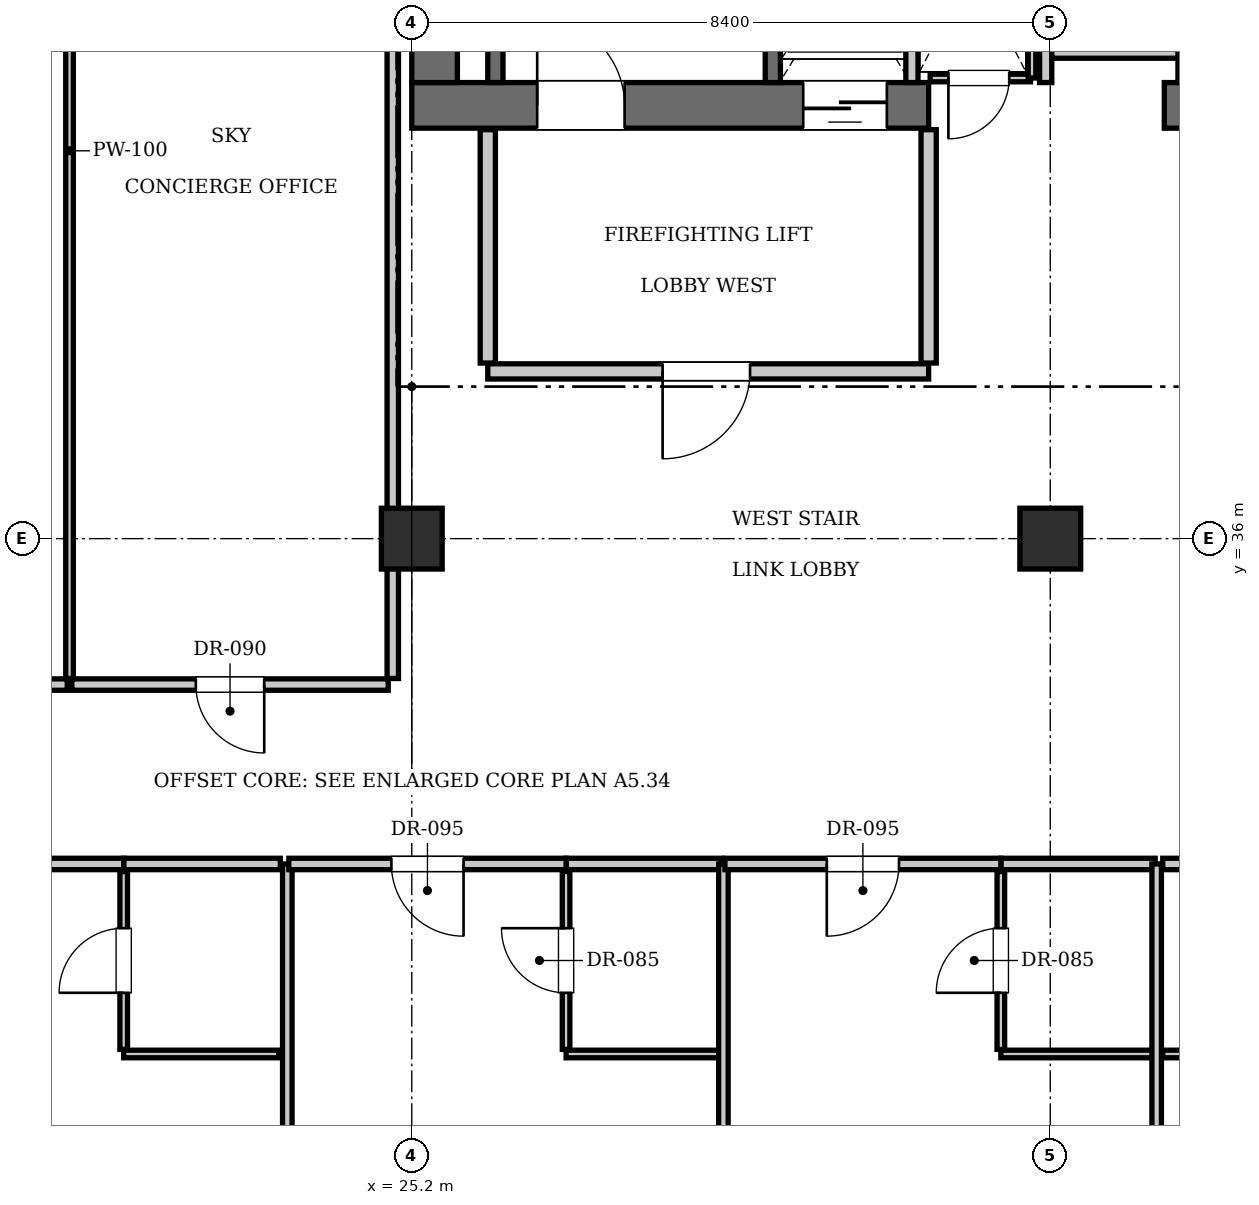
"""IFC4 building model, lengths in metres.
Left out: names, types, materials, properties, quantities, classifications, styles, units other than length and angle.
Written with IfcOpenShell. Run it as: python <this file> out.ifc"""

import sys

from ifc_helpers import new_model, si_unit, direction, frame, frame_2d, origin, origin_2d, place, context, subcontext, project, spatial, rectangle, extrude, element, fill, save


model = new_model("IFC4")
c1 = context("Model", 3, precision=1e-05, world=origin(), true_north=direction((0.0, 1.0)))
c2 = subcontext(c1, "Body", "Model", "MODEL_VIEW")
j1 = project(units=[si_unit("LENGTHUNIT", "METRE"), si_unit("PLANEANGLEUNIT", "RADIAN")], contexts=[c1])
p1 = place(None, origin())
s1 = spatial("IfcSite", under=j1, at=p1, CompositionType="ELEMENT")
p2 = place(p1, origin())
s2 = spatial("IfcBuilding", under=s1, at=p2, CompositionType="ELEMENT")
p3 = place(p2, frame((0.0, 0.0, 333.55)))
s3 = spatial("IfcBuildingStorey", under=s2, at=p3, CompositionType="ELEMENT", Elevation=333.55)
p4 = place(p3, frame((25.2, 41.7, 0.0), z_axis=(0.0, 0.0, 1.0), x_axis=(1.0, 0.0, 0.0)))
e1 = element("IfcWall", 1, at=p4, inside=s3, PredefinedType="SHEAR", context=c2, shape_type="SweptSolid", body=[
    extrude(rectangle(XDim=6.8, YDim=0.6, at=frame_2d((3.4, 0.0))), origin(), (0.0, 0.0, 1.0), 3.85),
])
p5 = place(p4, frame((1.65, 0.0, 0.0)))
e2 = element("IfcOpeningElement", 2, at=p5, cuts=e1, PredefinedType="OPENING", context=c2, shape_type="SweptSolid", body=[
    extrude(rectangle(XDim=1.15, YDim=2.15, at=frame_2d((0.575, 1.075))), frame((0.0, 0.31, 0.0), z_axis=(0.0, -1.0, 0.0), x_axis=(1.0, 0.0, 0.0)), (0.0, 0.0, 1.0), 0.62),
])
p6 = place(p4, frame((5.15, 0.0, 0.0)))
e3 = element("IfcOpeningElement", 3, at=p6, cuts=e1, PredefinedType="OPENING", context=c2, shape_type="SweptSolid", body=[
    extrude(rectangle(XDim=1.1, YDim=2.2, at=frame_2d((0.55, 1.1))), frame((0.0, 0.31, 0.0), z_axis=(0.0, -1.0, 0.0), x_axis=(1.0, 0.0, 0.0)), (0.0, 0.0, 1.0), 0.62),
])
p7 = place(p3, frame((35.1, 41.7, 0.0), z_axis=(0.0, 0.0, 1.0), x_axis=(1.0, 0.0, 0.0)))
e4 = element("IfcWall", 4, at=p7, inside=s3, PredefinedType="SHEAR", context=c2, shape_type="SweptSolid", body=[
    extrude(rectangle(XDim=5.4, YDim=0.6, at=frame_2d((2.7, 0.0))), origin(), (0.0, 0.0, 1.0), 3.85),
])
p8 = place(p3, frame((25.5, 42.0, 0.0), z_axis=(0.0, 0.0, 1.0), x_axis=(0.0, 1.0, 0.0)))
e5 = element("IfcWall", 5, at=p8, inside=s3, PredefinedType="SHEAR", context=c2, shape_type="SweptSolid", body=[
    extrude(rectangle(XDim=2.325, YDim=0.6, at=frame_2d((1.163, 0.0))), origin(), (0.0, 0.0, 1.0), 3.85),
])
for number, where, z_axis, x_axis in (
    (6, (25.2, 36.0, 0.0), (0.0, 0.0, 1.0), (1.0, 0.0, 0.0)),
    (7, (33.6, 36.0, 0.0), (0.0, 0.0, 1.0), (1.0, 0.0, 0.0)),
):
    element("IfcColumn", number, at=place(p3, frame(where, z_axis=z_axis, x_axis=x_axis)), inside=s3, PredefinedType="COLUMN", context=c2, shape_type="SweptSolid", body=[
        extrude(rectangle(XDim=0.8, YDim=0.8, at=origin_2d()), origin(), (0.0, 0.0, 1.0), 3.85),
    ])
p9 = place(p3, frame((29.95, 42.0, 0.0), z_axis=(0.0, 0.0, 1.0), x_axis=(0.0, 1.0, 0.0)))
e8 = element("IfcWall", 8, at=p9, inside=s3, PredefinedType="SOLIDWALL", context=c2, shape_type="SweptSolid", body=[
    extrude(rectangle(XDim=9.15, YDim=0.2, at=frame_2d((4.575, 0.0))), origin(), (0.0, 0.0, 1.0), 3.61),
])
p10 = place(p3, frame((26.3, 42.0, 0.0), z_axis=(0.0, 0.0, 1.0), x_axis=(0.0, 1.0, 0.0)))
e9 = element("IfcWall", 9, at=p10, inside=s3, PredefinedType="SOLIDWALL", context=c2, shape_type="SweptSolid", body=[
    extrude(rectangle(XDim=9.12, YDim=0.2, at=frame_2d((4.56, 0.0))), origin(), (0.0, 0.0, 1.0), 3.61),
])
p11 = place(p3, frame((31.78, 42.0, 0.0), z_axis=(0.0, 0.0, 1.0), x_axis=(0.0, 1.0, 0.0)))
e10 = element("IfcWall", 10, at=p11, inside=s3, PredefinedType="SOLIDWALL", context=c2, shape_type="SweptSolid", body=[
    extrude(rectangle(XDim=2.74, YDim=0.16, at=frame_2d((1.37, 0.0))), origin(), (0.0, 0.0, 1.0), 3.61),
])
for number, where, z_axis, x_axis in (
    (11, (33.54, 42.0, 0.0), (0.0, 0.0, 1.0), (0.0, 1.0, 0.0)),
    (12, (35.36, 42.0, 0.0), (0.0, 0.0, 1.0), (0.0, 1.0, 0.0)),
):
    element("IfcWall", number, at=place(p3, frame(where, z_axis=z_axis, x_axis=x_axis)), inside=s3, PredefinedType="SOLIDWALL", context=c2, shape_type="SweptSolid", body=[
        extrude(rectangle(XDim=2.4, YDim=0.16, at=frame_2d((1.2, 0.0))), origin(), (0.0, 0.0, 1.0), 3.61),
    ])
p12 = place(p3, frame((33.62, 42.4, 0.0), z_axis=(0.0, 0.0, 1.0), x_axis=(1.0, 0.0, 0.0)))
e13 = element("IfcWall", 13, at=p12, inside=s3, PredefinedType="SOLIDWALL", context=c2, shape_type="SweptSolid", body=[
    extrude(rectangle(XDim=1.66, YDim=0.16, at=frame_2d((0.83, 0.0))), origin(), (0.0, 0.0, 1.0), 3.61),
])
p13 = place(p3, frame((26.2, 38.2, 0.0), z_axis=(0.0, 0.0, 1.0), x_axis=(1.0, 0.0, 0.0)))
e14 = element("IfcWall", 14, at=p13, inside=s3, PredefinedType="PARTITIONING", context=c2, shape_type="SweptSolid", body=[
    extrude(rectangle(XDim=5.8, YDim=0.2, at=frame_2d((2.9, 0.0))), origin(), (0.0, 0.0, 1.0), 3.61),
])
p14 = place(p13, frame((2.3, 0.0, 0.0)))
e15 = element("IfcOpeningElement", 15, at=p14, cuts=e14, PredefinedType="OPENING", context=c2, shape_type="SweptSolid", body=[
    extrude(rectangle(XDim=1.15, YDim=2.15, at=frame_2d((0.575, 1.075))), frame((0.0, 0.11, 0.0), z_axis=(0.0, -1.0, 0.0), x_axis=(1.0, 0.0, 0.0)), (0.0, 0.0, 1.0), 0.22),
])
for number, where, z_axis, x_axis in (
    (16, (26.2, 38.31, 0.0), (0.0, 0.0, 1.0), (0.0, 1.0, 0.0)),
    (17, (32.0, 38.31, 0.0), (0.0, 0.0, 1.0), (0.0, 1.0, 0.0)),
):
    element("IfcWall", number, at=place(p3, frame(where, z_axis=z_axis, x_axis=x_axis)), inside=s3, PredefinedType="PARTITIONING", context=c2, shape_type="SweptSolid", body=[
        extrude(rectangle(XDim=3.07, YDim=0.2, at=frame_2d((1.535, 0.0))), origin(), (0.0, 0.0, 1.0), 3.61),
    ])
p15 = place(p3, frame((32.02, 42.06, 0.0), z_axis=(0.0, 0.0, 1.0), x_axis=(1.0, 0.0, 0.0)))
e18 = element("IfcWall", 18, at=p15, inside=s3, PredefinedType="PARTITIONING", context=c2, shape_type="SweptSolid", body=[
    extrude(rectangle(XDim=1.32, YDim=0.1, at=frame_2d((0.66, 0.0))), origin(), (0.0, 0.0, 1.0), 3.61),
])
p16 = place(p15, frame((0.24, 0.0, 0.0)))
e19 = element("IfcOpeningElement", 19, at=p16, cuts=e18, PredefinedType="OPENING", context=c2, shape_type="SweptSolid", body=[
    extrude(rectangle(XDim=0.8, YDim=2.05, at=frame_2d((0.4, 1.025))), frame((0.0, 0.06, 0.0), z_axis=(0.0, -1.0, 0.0), x_axis=(1.0, 0.0, 0.0)), (0.0, 0.0, 1.0), 0.12),
])
p17 = place(p3, frame((33.36, 42.06, 0.0), z_axis=(0.0, 0.0, 1.0), x_axis=(0.0, 1.0, 0.0)))
e20 = element("IfcWall", 20, at=p17, inside=s3, PredefinedType="PARTITIONING", context=c2, shape_type="SweptSolid", body=[
    extrude(rectangle(XDim=2.88, YDim=0.1, at=frame_2d((1.44, 0.0))), origin(), (0.0, 0.0, 1.0), 3.61),
])
p18 = place(p3, frame((24.95, 34.16, 0.0), z_axis=(0.0, 0.0, 1.0), x_axis=(0.0, 1.0, 0.0)))
e21 = element("IfcWall", 21, at=p18, inside=s3, PredefinedType="PARTITIONING", context=c2, shape_type="SweptSolid", body=[
    extrude(rectangle(XDim=13.885, YDim=0.15, at=frame_2d((6.942, 0.0))), origin(), (0.0, 0.0, 1.0), 3.61),
])
p19 = place(p3, frame((18.26, 34.08, 0.0), z_axis=(0.0, 0.0, 1.0), x_axis=(1.0, 0.0, 0.0)))
e22 = element("IfcWall", 22, at=p19, inside=s3, PredefinedType="PARTITIONING", context=c2, shape_type="SweptSolid", body=[
    extrude(rectangle(XDim=2.407, YDim=0.15, at=frame_2d((1.204, 0.0))), origin(), (0.0, 0.0, 1.0), 3.61),
])
p20 = place(p19, frame((0.754, 0.0, 0.0)))
e23 = element("IfcOpeningElement", 23, at=p20, cuts=e22, PredefinedType="OPENING", context=c2, shape_type="SweptSolid", body=[
    extrude(rectangle(XDim=0.9, YDim=2.1, at=frame_2d((0.45, 1.05))), frame((0.0, 0.085, 0.0), z_axis=(0.0, -1.0, 0.0), x_axis=(1.0, 0.0, 0.0)), (0.0, 0.0, 1.0), 0.17),
])
p21 = place(p3, frame((20.698, 34.16, 0.0), z_axis=(0.0, 0.0, 1.0), x_axis=(0.0, 1.0, 0.0)))
e24 = element("IfcWall", 24, at=p21, inside=s3, PredefinedType="PARTITIONING", context=c2, shape_type="SweptSolid", body=[
    extrude(rectangle(XDim=13.885, YDim=0.1, at=frame_2d((6.942, 0.0))), origin(), (0.0, 0.0, 1.0), 3.61),
])
p22 = place(p3, frame((20.728, 34.08, 0.0), z_axis=(0.0, 0.0, 1.0), x_axis=(1.0, 0.0, 0.0)))
e25 = element("IfcWall", 25, at=p22, inside=s3, PredefinedType="PARTITIONING", context=c2, shape_type="SweptSolid", body=[
    extrude(rectangle(XDim=4.162, YDim=0.15, at=frame_2d((2.081, 0.0))), origin(), (0.0, 0.0, 1.0), 3.61),
])
p23 = place(p22, frame((1.631, 0.0, 0.0)))
e26 = element("IfcOpeningElement", 26, at=p23, cuts=e25, PredefinedType="OPENING", context=c2, shape_type="SweptSolid", body=[
    extrude(rectangle(XDim=0.9, YDim=2.1, at=frame_2d((0.45, 1.05))), frame((0.0, 0.085, 0.0), z_axis=(0.0, -1.0, 0.0), x_axis=(1.0, 0.0, 0.0)), (0.0, 0.0, 1.0), 0.17),
])
p24 = place(p3, frame((23.562, 19.34, 0.0), z_axis=(0.0, 0.0, 1.0), x_axis=(0.0, 1.0, 0.0)))
e27 = element("IfcWall", 27, at=p24, inside=s3, PredefinedType="PARTITIONING", context=c2, shape_type="SweptSolid", body=[
    extrude(rectangle(XDim=12.38, YDim=0.125, at=frame_2d((6.19, 0.0))), origin(), (0.0, 0.0, 1.0), 3.61),
])
p25 = place(p3, frame((27.23, 31.72, 0.0), z_axis=(0.0, 0.0, 1.0), x_axis=(1.0, 0.0, 0.0)))
e28 = element("IfcWall", 28, at=p25, inside=s3, PredefinedType="PARTITIONING", context=c2, shape_type="SweptSolid", body=[
    extrude(rectangle(XDim=2.05, YDim=0.15, at=frame_2d((1.025, 0.0))), origin(), (0.0, 0.0, 1.0), 3.61),
])
p26 = place(p3, frame((27.23, 29.22, 0.0), z_axis=(0.0, 0.0, 1.0), x_axis=(1.0, 0.0, 0.0)))
e29 = element("IfcWall", 29, at=p26, inside=s3, PredefinedType="PARTITIONING", context=c2, shape_type="SweptSolid", body=[
    extrude(rectangle(XDim=2.03, YDim=0.1, at=frame_2d((1.015, 0.0))), origin(), (0.0, 0.0, 1.0), 3.61),
])
p27 = place(p3, frame((27.23, 29.28, 0.0), z_axis=(0.0, 0.0, 1.0), x_axis=(0.0, 1.0, 0.0)))
e30 = element("IfcWall", 30, at=p27, inside=s3, PredefinedType="PARTITIONING", context=c2, shape_type="SweptSolid", body=[
    extrude(rectangle(XDim=2.34, YDim=0.1, at=frame_2d((1.17, 0.0))), origin(), (0.0, 0.0, 1.0), 3.61),
])
p28 = place(p27, frame((0.745, 0.0, 0.0)))
e31 = element("IfcOpeningElement", 31, at=p28, cuts=e30, PredefinedType="OPENING", context=c2, shape_type="SweptSolid", body=[
    extrude(rectangle(XDim=0.85, YDim=2.1, at=frame_2d((0.425, 1.05))), frame((0.0, 0.06, 0.0), z_axis=(0.0, -1.0, 0.0), x_axis=(1.0, 0.0, 0.0)), (0.0, 0.0, 1.0), 0.12),
])
p29 = place(p3, frame((23.583, 31.72, 0.0), z_axis=(0.0, 0.0, 1.0), x_axis=(1.0, 0.0, 0.0)))
e32 = element("IfcWall", 32, at=p29, inside=s3, PredefinedType="PARTITIONING", context=c2, shape_type="SweptSolid", body=[
    extrude(rectangle(XDim=3.647, YDim=0.15, at=frame_2d((1.824, 0.0))), origin(), (0.0, 0.0, 1.0), 3.61),
])
p30 = place(p29, frame((1.349, 0.0, 0.0)))
e33 = element("IfcOpeningElement", 33, at=p30, cuts=e32, PredefinedType="OPENING", context=c2, shape_type="SweptSolid", body=[
    extrude(rectangle(XDim=0.95, YDim=2.15, at=frame_2d((0.475, 1.075))), frame((0.0, 0.085, 0.0), z_axis=(0.0, -1.0, 0.0), x_axis=(1.0, 0.0, 0.0)), (0.0, 0.0, 1.0), 0.17),
])
p31 = place(p3, frame((29.3, 13.9, 0.0), z_axis=(0.0, 0.0, 1.0), x_axis=(0.0, 1.0, 0.0)))
e34 = element("IfcWall", 34, at=p31, inside=s3, PredefinedType="PARTITIONING", context=c2, shape_type="SweptSolid", body=[
    extrude(rectangle(XDim=17.82, YDim=0.125, at=frame_2d((8.91, 0.0))), origin(), (0.0, 0.0, 1.0), 3.344),
])
p32 = place(p3, frame((32.95, 31.72, 0.0), z_axis=(0.0, 0.0, 1.0), x_axis=(1.0, 0.0, 0.0)))
e35 = element("IfcWall", 35, at=p32, inside=s3, PredefinedType="PARTITIONING", context=c2, shape_type="SweptSolid", body=[
    extrude(rectangle(XDim=2.03, YDim=0.15, at=frame_2d((1.015, 0.0))), origin(), (0.0, 0.0, 1.0), 3.61),
])
p33 = place(p3, frame((32.95, 29.22, 0.0), z_axis=(0.0, 0.0, 1.0), x_axis=(1.0, 0.0, 0.0)))
e36 = element("IfcWall", 36, at=p33, inside=s3, PredefinedType="PARTITIONING", context=c2, shape_type="SweptSolid", body=[
    extrude(rectangle(XDim=2.01, YDim=0.1, at=frame_2d((1.005, 0.0))), origin(), (0.0, 0.0, 1.0), 3.61),
])
p34 = place(p3, frame((32.95, 29.28, 0.0), z_axis=(0.0, 0.0, 1.0), x_axis=(0.0, 1.0, 0.0)))
e37 = element("IfcWall", 37, at=p34, inside=s3, PredefinedType="PARTITIONING", context=c2, shape_type="SweptSolid", body=[
    extrude(rectangle(XDim=2.34, YDim=0.1, at=frame_2d((1.17, 0.0))), origin(), (0.0, 0.0, 1.0), 3.61),
])
p35 = place(p34, frame((0.745, 0.0, 0.0)))
e38 = element("IfcOpeningElement", 38, at=p35, cuts=e37, PredefinedType="OPENING", context=c2, shape_type="SweptSolid", body=[
    extrude(rectangle(XDim=0.85, YDim=2.1, at=frame_2d((0.425, 1.05))), frame((0.0, 0.06, 0.0), z_axis=(0.0, -1.0, 0.0), x_axis=(1.0, 0.0, 0.0)), (0.0, 0.0, 1.0), 0.12),
])
p36 = place(p3, frame((29.32, 31.72, 0.0), z_axis=(0.0, 0.0, 1.0), x_axis=(1.0, 0.0, 0.0)))
e39 = element("IfcWall", 39, at=p36, inside=s3, PredefinedType="PARTITIONING", context=c2, shape_type="SweptSolid", body=[
    extrude(rectangle(XDim=3.63, YDim=0.15, at=frame_2d((1.815, 0.0))), origin(), (0.0, 0.0, 1.0), 3.61),
])
p37 = place(p36, frame((1.34, 0.0, 0.0)))
e40 = element("IfcOpeningElement", 40, at=p37, cuts=e39, PredefinedType="OPENING", context=c2, shape_type="SweptSolid", body=[
    extrude(rectangle(XDim=0.95, YDim=2.15, at=frame_2d((0.475, 1.075))), frame((0.0, 0.085, 0.0), z_axis=(0.0, -1.0, 0.0), x_axis=(1.0, 0.0, 0.0)), (0.0, 0.0, 1.0), 0.17),
])
p38 = place(p3, frame((35.0, 13.9, 0.0), z_axis=(0.0, 0.0, 1.0), x_axis=(0.0, 1.0, 0.0)))
e41 = element("IfcWall", 41, at=p38, inside=s3, PredefinedType="PARTITIONING", context=c2, shape_type="SweptSolid", body=[
    extrude(rectangle(XDim=17.82, YDim=0.125, at=frame_2d((8.91, 0.0))), origin(), (0.0, 0.0, 1.0), 3.61),
])
p39 = place(p3, frame((35.08, 31.72, 0.0), z_axis=(0.0, 0.0, 1.0), x_axis=(1.0, 0.0, 0.0)))
e42 = element("IfcWall", 42, at=p39, inside=s3, PredefinedType="PARTITIONING", context=c2, shape_type="SweptSolid", body=[
    extrude(rectangle(XDim=1.94, YDim=0.15, at=frame_2d((0.97, 0.0))), origin(), (0.0, 0.0, 1.0), 3.61),
])
p40 = place(p3, frame((35.08, 29.22, 0.0), z_axis=(0.0, 0.0, 1.0), x_axis=(1.0, 0.0, 0.0)))
e43 = element("IfcWall", 43, at=p40, inside=s3, PredefinedType="PARTITIONING", context=c2, shape_type="SweptSolid", body=[
    extrude(rectangle(XDim=1.94, YDim=0.1, at=frame_2d((0.97, 0.0))), origin(), (0.0, 0.0, 1.0), 3.61),
])
p41 = place(p3, frame((21.41, 31.72, 0.0), z_axis=(0.0, 0.0, 1.0), x_axis=(1.0, 0.0, 0.0)))
e44 = element("IfcWall", 44, at=p41, inside=s3, PredefinedType="PARTITIONING", context=c2, shape_type="SweptSolid", body=[
    extrude(rectangle(XDim=2.06, YDim=0.15, at=frame_2d((1.03, 0.0))), origin(), (0.0, 0.0, 1.0), 3.61),
])
p42 = place(p3, frame((21.41, 29.22, 0.0), z_axis=(0.0, 0.0, 1.0), x_axis=(1.0, 0.0, 0.0)))
e45 = element("IfcWall", 45, at=p42, inside=s3, PredefinedType="PARTITIONING", context=c2, shape_type="SweptSolid", body=[
    extrude(rectangle(XDim=2.04, YDim=0.1, at=frame_2d((1.02, 0.0))), origin(), (0.0, 0.0, 1.0), 3.61),
])
p43 = place(p3, frame((21.41, 29.28, 0.0), z_axis=(0.0, 0.0, 1.0), x_axis=(0.0, 1.0, 0.0)))
e46 = element("IfcWall", 46, at=p43, inside=s3, PredefinedType="PARTITIONING", context=c2, shape_type="SweptSolid", body=[
    extrude(rectangle(XDim=2.34, YDim=0.1, at=frame_2d((1.17, 0.0))), origin(), (0.0, 0.0, 1.0), 3.61),
])
p44 = place(p43, frame((0.745, 0.0, 0.0)))
e47 = element("IfcOpeningElement", 47, at=p44, cuts=e46, PredefinedType="OPENING", context=c2, shape_type="SweptSolid", body=[
    extrude(rectangle(XDim=0.85, YDim=2.1, at=frame_2d((0.425, 1.05))), frame((0.0, 0.06, 0.0), z_axis=(0.0, -1.0, 0.0), x_axis=(1.0, 0.0, 0.0)), (0.0, 0.0, 1.0), 0.12),
])
p45 = place(p3, frame((17.79, 31.72, 0.0), z_axis=(0.0, 0.0, 1.0), x_axis=(1.0, 0.0, 0.0)))
e48 = element("IfcWall", 48, at=p45, inside=s3, PredefinedType="PARTITIONING", context=c2, shape_type="SweptSolid", body=[
    extrude(rectangle(XDim=3.62, YDim=0.15, at=frame_2d((1.81, 0.0))), origin(), (0.0, 0.0, 1.0), 3.61),
])
p46 = place(p45, frame((1.335, 0.0, 0.0)))
e49 = element("IfcOpeningElement", 49, at=p46, cuts=e48, PredefinedType="OPENING", context=c2, shape_type="SweptSolid", body=[
    extrude(rectangle(XDim=0.95, YDim=2.15, at=frame_2d((0.475, 1.075))), frame((0.0, 0.085, 0.0), z_axis=(0.0, -1.0, 0.0), x_axis=(1.0, 0.0, 0.0)), (0.0, 0.0, 1.0), 0.17),
])
p47 = place(p5, origin())
e50 = element("IfcDoor", 50, at=p47, inside=s3, OperationType="SINGLE_SWING_LEFT", PredefinedType="DOOR", context=c2, shape_type="SweptSolid", body=[
    extrude(rectangle(XDim=1.15, YDim=2.15, at=frame_2d((0.575, 1.075))), frame((0.0, 0.025, 0.0), z_axis=(0.0, -1.0, 0.0), x_axis=(1.0, 0.0, 0.0)), (0.0, 0.0, 1.0), 0.05),
])
fill(e2, e50)
p48 = place(p6, frame((1.1, 0.0, 0.0), z_axis=(0.0, 0.0, 1.0), x_axis=(-1.0, 0.0, 0.0)))
e51 = element("IfcDoor", 51, at=p48, inside=s3, OperationType="SLIDING_TO_LEFT", PredefinedType="DOOR", context=c2, shape_type="SweptSolid", body=[
    extrude(rectangle(XDim=1.1, YDim=2.2, at=frame_2d((0.55, 1.1))), frame((0.0, 0.025, 0.0), z_axis=(0.0, -1.0, 0.0), x_axis=(1.0, 0.0, 0.0)), (0.0, 0.0, 1.0), 0.05),
])
fill(e3, e51)
p49 = place(p14, frame((1.15, 0.0, 0.0), z_axis=(0.0, 0.0, 1.0), x_axis=(-1.0, 0.0, 0.0)))
e52 = element("IfcDoor", 52, at=p49, inside=s3, OperationType="SINGLE_SWING_RIGHT", PredefinedType="DOOR", context=c2, shape_type="SweptSolid", body=[
    extrude(rectangle(XDim=1.15, YDim=2.15, at=frame_2d((0.575, 1.075))), frame((0.0, 0.025, 0.0), z_axis=(0.0, -1.0, 0.0), x_axis=(1.0, 0.0, 0.0)), (0.0, 0.0, 1.0), 0.05),
])
fill(e15, e52)
p50 = place(p16, frame((0.8, 0.0, 0.0), z_axis=(0.0, 0.0, 1.0), x_axis=(-1.0, 0.0, 0.0)))
e53 = element("IfcDoor", 53, at=p50, inside=s3, OperationType="SINGLE_SWING_RIGHT", PredefinedType="DOOR", context=c2, shape_type="SweptSolid", body=[
    extrude(rectangle(XDim=0.8, YDim=2.05, at=frame_2d((0.4, 1.025))), frame((0.0, 0.025, 0.0), z_axis=(0.0, -1.0, 0.0), x_axis=(1.0, 0.0, 0.0)), (0.0, 0.0, 1.0), 0.05),
])
fill(e19, e53)
p51 = place(p23, frame((0.9, 0.0, 0.0), z_axis=(0.0, 0.0, 1.0), x_axis=(-1.0, 0.0, 0.0)))
e54 = element("IfcDoor", 54, at=p51, inside=s3, OperationType="SINGLE_SWING_LEFT", PredefinedType="DOOR", context=c2, shape_type="SweptSolid", body=[
    extrude(rectangle(XDim=0.9, YDim=2.1, at=frame_2d((0.45, 1.05))), frame((0.0, 0.025, 0.0), z_axis=(0.0, -1.0, 0.0), x_axis=(1.0, 0.0, 0.0)), (0.0, 0.0, 1.0), 0.05),
])
fill(e26, e54)
p52 = place(p28, origin())
e55 = element("IfcDoor", 55, at=p52, inside=s3, OperationType="SINGLE_SWING_RIGHT", PredefinedType="DOOR", context=c2, shape_type="SweptSolid", body=[
    extrude(rectangle(XDim=0.85, YDim=2.1, at=frame_2d((0.425, 1.05))), frame((0.0, 0.025, 0.0), z_axis=(0.0, -1.0, 0.0), x_axis=(1.0, 0.0, 0.0)), (0.0, 0.0, 1.0), 0.05),
])
fill(e31, e55)
p53 = place(p30, frame((0.95, 0.0, 0.0), z_axis=(0.0, 0.0, 1.0), x_axis=(-1.0, 0.0, 0.0)))
e56 = element("IfcDoor", 56, at=p53, inside=s3, OperationType="SINGLE_SWING_LEFT", PredefinedType="DOOR", context=c2, shape_type="SweptSolid", body=[
    extrude(rectangle(XDim=0.95, YDim=2.15, at=frame_2d((0.475, 1.075))), frame((0.0, 0.025, 0.0), z_axis=(0.0, -1.0, 0.0), x_axis=(1.0, 0.0, 0.0)), (0.0, 0.0, 1.0), 0.05),
])
fill(e33, e56)
p54 = place(p35, origin())
e57 = element("IfcDoor", 57, at=p54, inside=s3, OperationType="SINGLE_SWING_LEFT", PredefinedType="DOOR", context=c2, shape_type="SweptSolid", body=[
    extrude(rectangle(XDim=0.85, YDim=2.1, at=frame_2d((0.425, 1.05))), frame((0.0, 0.025, 0.0), z_axis=(0.0, -1.0, 0.0), x_axis=(1.0, 0.0, 0.0)), (0.0, 0.0, 1.0), 0.05),
])
fill(e38, e57)
p55 = place(p37, frame((0.95, 0.0, 0.0), z_axis=(0.0, 0.0, 1.0), x_axis=(-1.0, 0.0, 0.0)))
e58 = element("IfcDoor", 58, at=p55, inside=s3, OperationType="SINGLE_SWING_RIGHT", PredefinedType="DOOR", context=c2, shape_type="SweptSolid", body=[
    extrude(rectangle(XDim=0.95, YDim=2.15, at=frame_2d((0.475, 1.075))), frame((0.0, 0.025, 0.0), z_axis=(0.0, -1.0, 0.0), x_axis=(1.0, 0.0, 0.0)), (0.0, 0.0, 1.0), 0.05),
])
fill(e40, e58)
p56 = place(p44, origin())
e59 = element("IfcDoor", 59, at=p56, inside=s3, OperationType="SINGLE_SWING_LEFT", PredefinedType="DOOR", context=c2, shape_type="SweptSolid", body=[
    extrude(rectangle(XDim=0.85, YDim=2.1, at=frame_2d((0.425, 1.05))), frame((0.0, 0.025, 0.0), z_axis=(0.0, -1.0, 0.0), x_axis=(1.0, 0.0, 0.0)), (0.0, 0.0, 1.0), 0.05),
])
fill(e47, e59)
save(model, sys.argv[1])
